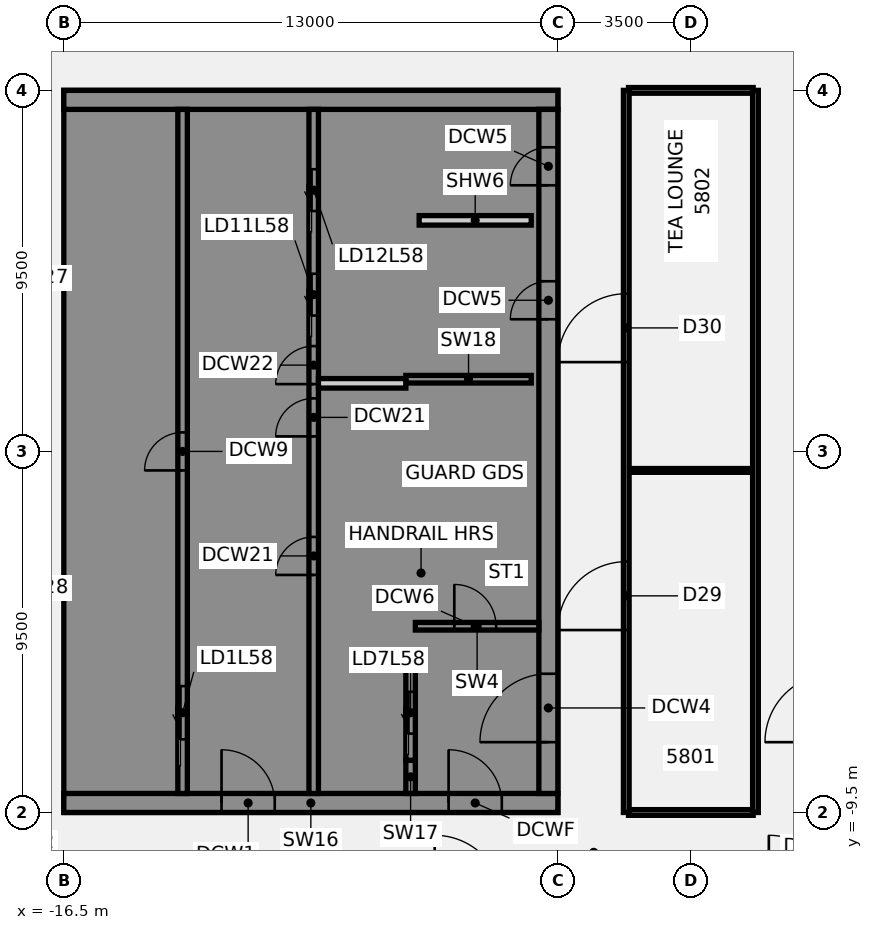
"""IFC4 building model, lengths in metres.
Left out: names, types, materials, properties, quantities, classifications, styles, units other than length and angle.
Written with IfcOpenShell. Run it as: python <this file> out.ifc"""

import sys

from ifc_helpers import new_model, si_unit, direction, frame, frame_2d, origin, place, context, subcontext, project, spatial, polyline, rectangle, outline, extrude, element, fill, save


model = new_model("IFC4")
c1 = context("Model", 3, precision=1e-05, world=origin(), true_north=direction((0.0, 1.0)))
c2 = subcontext(c1, "Body", "Model", "MODEL_VIEW")
j1 = project(units=[si_unit("LENGTHUNIT", "METRE"), si_unit("PLANEANGLEUNIT", "RADIAN")], contexts=[c1])
p1 = place(None, origin())
s1 = spatial("IfcSite", under=j1, at=p1, CompositionType="ELEMENT")
p2 = place(p1, origin())
s2 = spatial("IfcBuilding", under=s1, at=p2, CompositionType="ELEMENT")
p3 = place(p2, frame((0.0, 0.0, 230.7)))
s3 = spatial("IfcBuildingStorey", under=s2, at=p3, CompositionType="ELEMENT", Elevation=230.7)
p4 = place(p3, frame((-1.64, -9.5, 0.0), z_axis=(0.0, 0.0, 1.0), x_axis=(1.0, 0.0, 0.0)))
e1 = element("IfcWall", 1, at=p4, inside=s3, PredefinedType="PARTITIONING", context=c2, shape_type="SweptSolid", body=[
    extrude(rectangle(XDim=3.28, YDim=0.15, at=frame_2d((1.64, 0.0))), origin(), (0.0, 0.0, 1.0), 2.864),
])
p5 = place(p3, frame((-1.64, -0.5, 0.0), z_axis=(0.0, 0.0, 1.0), x_axis=(1.0, 0.0, 0.0)))
e2 = element("IfcWall", 2, at=p5, inside=s3, PredefinedType="PARTITIONING", context=c2, shape_type="SweptSolid", body=[
    extrude(rectangle(XDim=3.28, YDim=0.1, at=frame_2d((1.64, 0.0))), origin(), (0.0, 0.0, 1.0), 2.864),
])
p6 = place(p3, frame((-1.64, 9.5, 0.0), z_axis=(0.0, 0.0, 1.0), x_axis=(1.0, 0.0, 0.0)))
e3 = element("IfcWall", 3, at=p6, inside=s3, PredefinedType="PARTITIONING", context=c2, shape_type="SweptSolid", body=[
    extrude(rectangle(XDim=3.28, YDim=0.15, at=frame_2d((1.64, 0.0))), origin(), (0.0, 0.0, 1.0), 2.864),
])
p7 = place(p3, frame((-1.7, -9.5, 0.0), z_axis=(0.0, 0.0, 1.0), x_axis=(0.0, 1.0, 0.0)))
e4 = element("IfcWall", 4, at=p7, inside=s3, PredefinedType="PARTITIONING", context=c2, shape_type="SweptSolid", body=[
    extrude(rectangle(XDim=19.0, YDim=0.15, at=frame_2d((9.5, 0.0))), origin(), (0.0, 0.0, 1.0), 2.864),
])
p8 = place(p7, frame((4.8, 0.0, 0.0)))
e5 = element("IfcOpeningElement", 5, at=p8, cuts=e4, PredefinedType="OPENING", context=c2, shape_type="SweptSolid", body=[
    extrude(rectangle(XDim=1.8, YDim=2.1, at=frame_2d((0.9, 1.05))), frame((0.0, 0.085, 0.0), z_axis=(0.0, -1.0, 0.0), x_axis=(1.0, 0.0, 0.0)), (0.0, 0.0, 1.0), 0.17),
])
p9 = place(p7, frame((11.85, 0.0, 0.0)))
e6 = element("IfcOpeningElement", 6, at=p9, cuts=e4, PredefinedType="OPENING", context=c2, shape_type="SweptSolid", body=[
    extrude(rectangle(XDim=1.8, YDim=2.1, at=frame_2d((0.9, 1.05))), frame((0.0, 0.085, 0.0), z_axis=(0.0, -1.0, 0.0), x_axis=(1.0, 0.0, 0.0)), (0.0, 0.0, 1.0), 0.17),
])
p10 = place(p3, frame((1.7, -9.5, 0.0), z_axis=(0.0, 0.0, 1.0), x_axis=(0.0, 1.0, 0.0)))
e7 = element("IfcWall", 7, at=p10, inside=s3, PredefinedType="PARTITIONING", context=c2, shape_type="SweptSolid", body=[
    extrude(rectangle(XDim=19.0, YDim=0.15, at=frame_2d((9.5, 0.0))), origin(), (0.0, 0.0, 1.0), 2.864),
])
p11 = place(p3, frame((-16.5, -9.25, 0.0), z_axis=(0.0, 0.0, 1.0), x_axis=(1.0, 0.0, 0.0)))
e8 = element("IfcWall", 8, at=p11, inside=s3, PredefinedType="SHEAR", context=c2, shape_type="SweptSolid", body=[
    extrude(rectangle(XDim=13.0, YDim=0.5, at=frame_2d((6.5, 0.0))), origin(), (0.0, 0.0, 1.0), 3.46),
])
p12 = place(p11, frame((4.15, 0.0, 0.0)))
e9 = element("IfcOpeningElement", 9, at=p12, cuts=e8, PredefinedType="OPENING", context=c2, shape_type="SweptSolid", body=[
    extrude(rectangle(XDim=1.4, YDim=2.1, at=frame_2d((0.7, 1.05))), frame((0.0, 0.26, 0.0), z_axis=(0.0, -1.0, 0.0), x_axis=(1.0, 0.0, 0.0)), (0.0, 0.0, 1.0), 0.52),
])
p13 = place(p11, frame((10.125, 0.0, 0.0)))
e10 = element("IfcOpeningElement", 10, at=p13, cuts=e8, PredefinedType="OPENING", context=c2, shape_type="SweptSolid", body=[
    extrude(rectangle(XDim=1.4, YDim=2.1, at=frame_2d((0.7, 1.05))), frame((0.0, 0.26, 0.0), z_axis=(0.0, -1.0, 0.0), x_axis=(1.0, 0.0, 0.0)), (0.0, 0.0, 1.0), 0.52),
])
p14 = place(p3, origin())
e11 = element("IfcWall", 11, at=p14, inside=s3, PredefinedType="SHEAR", context=c2, shape_type="SweptSolid", body=[
    extrude(outline(polyline([(-13.5, -8.125), (-16.0, -8.125), (-16.0, -5.625), (-13.5, -5.625), (-13.5, -5.375), (-16.0, -5.375), (-16.0, 5.375), (-13.5, 5.375), (-13.5, 5.625), (-16.0, 5.625), (-16.0, 8.125), (-13.5, 8.125), (-13.5, 9.0), (-16.0, 9.0), (-16.5, 9.0), (-16.5, -9.0), (-16.0, -9.0), (-13.5, -9.0), (-13.5, -8.125)])), origin(), (0.0, 0.0, 1.0), 3.46),
])
p15 = place(p3, frame((-16.5, 9.25, 0.0), z_axis=(0.0, 0.0, 1.0), x_axis=(1.0, 0.0, 0.0)))
e12 = element("IfcWall", 12, at=p15, inside=s3, PredefinedType="SHEAR", context=c2, shape_type="SweptSolid", body=[
    extrude(rectangle(XDim=13.0, YDim=0.5, at=frame_2d((6.5, 0.0))), origin(), (0.0, 0.0, 1.0), 3.46),
])
p16 = place(p3, origin())
e13 = element("IfcWall", 13, at=p16, inside=s3, PredefinedType="SHEAR", context=c2, shape_type="SweptSolid", body=[
    extrude(outline(polyline([(-9.8, -5.375), (-9.8, -5.625), (-7.5, -5.625), (-7.25, -5.625), (-7.25, 9.0), (-7.5, 9.0), (-9.8, 9.0), (-9.8, 8.125), (-7.5, 8.125), (-7.5, 5.625), (-9.8, 5.625), (-9.8, 5.375), (-7.5, 5.375), (-7.5, 2.875), (-9.8, 2.875), (-9.8, 2.625), (-7.5, 2.625), (-7.5, -5.375), (-9.8, -5.375)])), origin(), (0.0, 0.0, 1.0), 3.46),
])
p17 = place(p3, origin())
e14 = element("IfcWall", 14, at=p17, inside=s3, PredefinedType="SHEAR", context=c2, shape_type="SweptSolid", body=[
    extrude(outline(polyline([(-7.5, -8.125), (-9.55, -8.125), (-9.55, -5.625), (-9.8, -5.625), (-9.8, -8.125), (-9.8, -9.0), (-7.5, -9.0), (-7.5, -8.125)])), origin(), (0.0, 0.0, 1.0), 3.46),
])
p18 = place(p3, frame((-7.375, -9.0, 0.0), z_axis=(0.0, 0.0, 1.0), x_axis=(0.0, 1.0, 0.0)))
e15 = element("IfcWall", 15, at=p18, inside=s3, PredefinedType="SHEAR", context=c2, shape_type="SweptSolid", body=[
    extrude(rectangle(XDim=0.875, YDim=0.25, at=frame_2d((0.438, 0.0))), origin(), (0.0, 0.0, 1.0), 3.46),
])
p19 = place(p3, frame((-7.5, 1.9, 0.0), z_axis=(0.0, 0.0, 1.0), x_axis=(1.0, 0.0, 0.0)))
e16 = element("IfcWall", 16, at=p19, inside=s3, PredefinedType="SHEAR", context=c2, shape_type="SweptSolid", body=[
    extrude(rectangle(XDim=3.3, YDim=0.2, at=frame_2d((1.65, 0.0))), origin(), (0.0, 0.0, 1.0), 3.46),
])
p20 = place(p3, frame((-13.375, -9.0, 0.0), z_axis=(0.0, 0.0, 1.0), x_axis=(0.0, 1.0, 0.0)))
e17 = element("IfcWall", 17, at=p20, inside=s3, PredefinedType="SHEAR", context=c2, shape_type="SweptSolid", body=[
    extrude(rectangle(XDim=18.0, YDim=0.25, at=frame_2d((9.0, 0.0))), origin(), (0.0, 0.0, 1.0), 3.46),
])
p21 = place(p20, frame((1.425, 0.0, 0.0)))
e18 = element("IfcOpeningElement", 18, at=p21, cuts=e17, PredefinedType="OPENING", context=c2, shape_type="SweptSolid", body=[
    extrude(rectangle(XDim=1.4, YDim=2.1, at=frame_2d((0.7, 1.05))), frame((0.0, 0.135, 0.0), z_axis=(0.0, -1.0, 0.0), x_axis=(1.0, 0.0, 0.0)), (0.0, 0.0, 1.0), 0.27),
])
p22 = place(p20, frame((8.5, 0.0, 0.0)))
e19 = element("IfcOpeningElement", 19, at=p22, cuts=e17, PredefinedType="OPENING", context=c2, shape_type="SweptSolid", body=[
    extrude(rectangle(XDim=1.0, YDim=2.1, at=frame_2d((0.5, 1.05))), frame((0.0, 0.135, 0.0), z_axis=(0.0, -1.0, 0.0), x_axis=(1.0, 0.0, 0.0)), (0.0, 0.0, 1.0), 0.27),
])
p23 = place(p3, frame((-9.925, -9.0, 0.0), z_axis=(0.0, 0.0, 1.0), x_axis=(0.0, 1.0, 0.0)))
e20 = element("IfcWall", 20, at=p23, inside=s3, PredefinedType="SHEAR", context=c2, shape_type="SweptSolid", body=[
    extrude(rectangle(XDim=18.0, YDim=0.25, at=frame_2d((9.0, 0.0))), origin(), (0.0, 0.0, 1.0), 3.46),
])
p24 = place(p23, frame((12.575, 0.0, 0.0)))
e21 = element("IfcOpeningElement", 21, at=p24, cuts=e20, PredefinedType="OPENING", context=c2, shape_type="SweptSolid", body=[
    extrude(rectangle(XDim=1.1, YDim=2.1, at=frame_2d((0.55, 1.05))), frame((0.0, 0.135, 0.0), z_axis=(0.0, -1.0, 0.0), x_axis=(1.0, 0.0, 0.0)), (0.0, 0.0, 1.0), 0.27),
])
p25 = place(p23, frame((15.325, 0.0, 0.0)))
e22 = element("IfcOpeningElement", 22, at=p25, cuts=e20, PredefinedType="OPENING", context=c2, shape_type="SweptSolid", body=[
    extrude(rectangle(XDim=1.1, YDim=2.1, at=frame_2d((0.55, 1.05))), frame((0.0, 0.135, 0.0), z_axis=(0.0, -1.0, 0.0), x_axis=(1.0, 0.0, 0.0)), (0.0, 0.0, 1.0), 0.27),
])
p26 = place(p23, frame((5.75, 0.0, 0.0)))
e23 = element("IfcOpeningElement", 23, at=p26, cuts=e20, PredefinedType="OPENING", context=c2, shape_type="SweptSolid", body=[
    extrude(rectangle(XDim=1.0, YDim=2.1, at=frame_2d((0.5, 1.05))), frame((0.0, 0.135, 0.0), z_axis=(0.0, -1.0, 0.0), x_axis=(1.0, 0.0, 0.0)), (0.0, 0.0, 1.0), 0.27),
])
p27 = place(p23, frame((9.396, 0.0, 0.0)))
e24 = element("IfcOpeningElement", 24, at=p27, cuts=e20, PredefinedType="OPENING", context=c2, shape_type="SweptSolid", body=[
    extrude(rectangle(XDim=1.0, YDim=2.1, at=frame_2d((0.5, 1.05))), frame((0.0, 0.135, 0.0), z_axis=(0.0, -1.0, 0.0), x_axis=(1.0, 0.0, 0.0)), (0.0, 0.0, 1.0), 0.27),
])
p28 = place(p23, frame((10.771, 0.0, 0.0)))
e25 = element("IfcOpeningElement", 25, at=p28, cuts=e20, PredefinedType="OPENING", context=c2, shape_type="SweptSolid", body=[
    extrude(rectangle(XDim=1.0, YDim=2.1, at=frame_2d((0.5, 1.05))), frame((0.0, 0.135, 0.0), z_axis=(0.0, -1.0, 0.0), x_axis=(1.0, 0.0, 0.0)), (0.0, 0.0, 1.0), 0.27),
])
p29 = place(p3, frame((-7.375, -8.125, 0.0), z_axis=(0.0, 0.0, 1.0), x_axis=(0.0, 1.0, 0.0)))
e26 = element("IfcWall", 26, at=p29, inside=s3, PredefinedType="SHEAR", context=c2, shape_type="SweptSolid", body=[
    extrude(rectangle(XDim=2.5, YDim=0.25, at=frame_2d((1.25, 0.0))), origin(), (0.0, 0.0, 1.0), 3.46),
])
p30 = place(p29, frame((0.7, 0.0, 0.0)))
e27 = element("IfcOpeningElement", 27, at=p30, cuts=e26, PredefinedType="OPENING", context=c2, shape_type="SweptSolid", body=[
    extrude(rectangle(XDim=1.1, YDim=2.1, at=frame_2d((0.55, 1.05))), frame((0.0, 0.135, 0.0), z_axis=(0.0, -1.0, 0.0), x_axis=(1.0, 0.0, 0.0)), (0.0, 0.0, 1.0), 0.27),
])
p31 = place(p3, frame((-3.75, -9.0, 0.0), z_axis=(0.0, 0.0, 1.0), x_axis=(0.0, 1.0, 0.0)))
e28 = element("IfcWall", 28, at=p31, inside=s3, PredefinedType="SHEAR", context=c2, shape_type="SweptSolid", body=[
    extrude(rectangle(XDim=18.0, YDim=0.5, at=frame_2d((9.0, 0.0))), origin(), (0.0, 0.0, 1.0), 3.46),
])
p32 = place(p31, frame((1.35, 0.0, 0.0)))
e29 = element("IfcOpeningElement", 29, at=p32, cuts=e28, PredefinedType="OPENING", context=c2, shape_type="SweptSolid", body=[
    extrude(rectangle(XDim=1.8, YDim=2.1, at=frame_2d((0.9, 1.05))), frame((0.0, 0.26, 0.0), z_axis=(0.0, -1.0, 0.0), x_axis=(1.0, 0.0, 0.0)), (0.0, 0.0, 1.0), 0.52),
])
p33 = place(p31, frame((12.478, 0.0, 0.0)))
e30 = element("IfcOpeningElement", 30, at=p33, cuts=e28, PredefinedType="OPENING", context=c2, shape_type="SweptSolid", body=[
    extrude(rectangle(XDim=1.0, YDim=2.1, at=frame_2d((0.5, 1.05))), frame((0.0, 0.26, 0.0), z_axis=(0.0, -1.0, 0.0), x_axis=(1.0, 0.0, 0.0)), (0.0, 0.0, 1.0), 0.52),
])
p34 = place(p31, frame((16.002, 0.0, 0.0)))
e31 = element("IfcOpeningElement", 31, at=p34, cuts=e28, PredefinedType="OPENING", context=c2, shape_type="SweptSolid", body=[
    extrude(rectangle(XDim=1.0, YDim=2.1, at=frame_2d((0.5, 1.05))), frame((0.0, 0.26, 0.0), z_axis=(0.0, -1.0, 0.0), x_axis=(1.0, 0.0, 0.0)), (0.0, 0.0, 1.0), 0.52),
])
p35 = place(p3, frame((-7.15, 6.08, 0.0), z_axis=(0.0, 0.0, 1.0), x_axis=(1.0, 0.0, 0.0)))
e32 = element("IfcWall", 32, at=p35, inside=s3, PredefinedType="PARTITIONING", context=c2, shape_type="SweptSolid", body=[
    extrude(rectangle(XDim=2.95, YDim=0.25, at=frame_2d((1.475, 0.0))), origin(), (0.0, 0.0, 1.0), 3.46),
])
p36 = place(p3, frame((-7.25, -4.6, 0.0), z_axis=(0.0, 0.0, 1.0), x_axis=(1.0, 0.0, 0.0)))
e33 = element("IfcWall", 33, at=p36, inside=s3, PredefinedType="SHEAR", context=c2, shape_type="SweptSolid", body=[
    extrude(rectangle(XDim=3.25, YDim=0.2, at=frame_2d((1.625, 0.0))), origin(), (0.0, 0.0, 1.0), 3.46),
])
p37 = place(p36, frame((1.025, 0.0, 0.0)))
e34 = element("IfcOpeningElement", 34, at=p37, cuts=e33, PredefinedType="OPENING", context=c2, shape_type="SweptSolid", body=[
    extrude(rectangle(XDim=1.1, YDim=2.1, at=frame_2d((0.55, 1.05))), frame((0.0, 0.11, 0.0), z_axis=(0.0, -1.0, 0.0), x_axis=(1.0, 0.0, 0.0)), (0.0, 0.0, 1.0), 0.22),
])
p38 = place(p3, frame((-9.8, 1.792, 0.0), z_axis=(0.0, 0.0, 1.0), x_axis=(1.0, 0.0, 0.0)))
e35 = element("IfcWall", 35, at=p38, inside=s3, PredefinedType="PARTITIONING", context=c2, shape_type="SweptSolid", body=[
    extrude(rectangle(XDim=2.3, YDim=0.25, at=frame_2d((1.15, 0.0))), origin(), (0.0, 0.0, 1.0), 3.46),
])
p39 = place(p8, frame((1.8, 0.0, 0.0), z_axis=(0.0, 0.0, 1.0), x_axis=(-1.0, 0.0, 0.0)))
e36 = element("IfcDoor", 36, at=p39, inside=s3, OperationType="DOUBLE_DOOR_SINGLE_SWING", PredefinedType="DOOR", context=c2, shape_type="SweptSolid", body=[
    extrude(rectangle(XDim=1.8, YDim=2.1, at=frame_2d((0.9, 1.05))), frame((0.0, 0.025, 0.0), z_axis=(0.0, -1.0, 0.0), x_axis=(1.0, 0.0, 0.0)), (0.0, 0.0, 1.0), 0.05),
])
fill(e5, e36)
p40 = place(p9, frame((1.8, 0.0, 0.0), z_axis=(0.0, 0.0, 1.0), x_axis=(-1.0, 0.0, 0.0)))
e37 = element("IfcDoor", 37, at=p40, inside=s3, OperationType="DOUBLE_DOOR_SINGLE_SWING", PredefinedType="DOOR", context=c2, shape_type="SweptSolid", body=[
    extrude(rectangle(XDim=1.8, YDim=2.1, at=frame_2d((0.9, 1.05))), frame((0.0, 0.025, 0.0), z_axis=(0.0, -1.0, 0.0), x_axis=(1.0, 0.0, 0.0)), (0.0, 0.0, 1.0), 0.05),
])
fill(e6, e37)
p41 = place(p12, origin())
e38 = element("IfcDoor", 38, at=p41, inside=s3, OperationType="SINGLE_SWING_LEFT", PredefinedType="DOOR", context=c2, shape_type="SweptSolid", body=[
    extrude(rectangle(XDim=1.4, YDim=2.1, at=frame_2d((0.7, 1.05))), frame((0.0, 0.025, 0.0), z_axis=(0.0, -1.0, 0.0), x_axis=(1.0, 0.0, 0.0)), (0.0, 0.0, 1.0), 0.05),
])
fill(e9, e38)
p42 = place(p13, origin())
e39 = element("IfcDoor", 39, at=p42, inside=s3, OperationType="SINGLE_SWING_LEFT", PredefinedType="DOOR", context=c2, shape_type="SweptSolid", body=[
    extrude(rectangle(XDim=1.4, YDim=2.1, at=frame_2d((0.7, 1.05))), frame((0.0, 0.025, 0.0), z_axis=(0.0, -1.0, 0.0), x_axis=(1.0, 0.0, 0.0)), (0.0, 0.0, 1.0), 0.05),
])
fill(e10, e39)
p43 = place(p32, origin())
e40 = element("IfcDoor", 40, at=p43, inside=s3, OperationType="SINGLE_SWING_LEFT", PredefinedType="DOOR", context=c2, shape_type="SweptSolid", body=[
    extrude(rectangle(XDim=1.8, YDim=2.1, at=frame_2d((0.9, 1.05))), frame((0.0, 0.025, 0.0), z_axis=(0.0, -1.0, 0.0), x_axis=(1.0, 0.0, 0.0)), (0.0, 0.0, 1.0), 0.05),
])
fill(e29, e40)
p44 = place(p33, origin())
e41 = element("IfcDoor", 41, at=p44, inside=s3, OperationType="SINGLE_SWING_LEFT", PredefinedType="DOOR", context=c2, shape_type="SweptSolid", body=[
    extrude(rectangle(XDim=1.0, YDim=2.1, at=frame_2d((0.5, 1.05))), frame((0.0, 0.225, 0.0), z_axis=(0.0, -1.0, 0.0), x_axis=(1.0, 0.0, 0.0)), (0.0, 0.0, 1.0), 0.05),
])
fill(e30, e41)
p45 = place(p34, origin())
e42 = element("IfcDoor", 42, at=p45, inside=s3, OperationType="SINGLE_SWING_LEFT", PredefinedType="DOOR", context=c2, shape_type="SweptSolid", body=[
    extrude(rectangle(XDim=1.0, YDim=2.1, at=frame_2d((0.5, 1.05))), frame((0.0, 0.225, 0.0), z_axis=(0.0, -1.0, 0.0), x_axis=(1.0, 0.0, 0.0)), (0.0, 0.0, 1.0), 0.05),
])
fill(e31, e42)
p46 = place(p37, origin())
e43 = element("IfcDoor", 43, at=p46, inside=s3, OperationType="SINGLE_SWING_LEFT", PredefinedType="DOOR", context=c2, shape_type="SweptSolid", body=[
    extrude(rectangle(XDim=1.1, YDim=2.1, at=frame_2d((0.55, 1.05))), frame((0.0, 0.025, 0.0), z_axis=(0.0, -1.0, 0.0), x_axis=(1.0, 0.0, 0.0)), (0.0, 0.0, 1.0), 0.05),
])
fill(e34, e43)
p47 = place(p21, origin())
e44 = element("IfcDoor", 44, at=p47, inside=s3, OperationType="SLIDING_TO_LEFT", PredefinedType="DOOR", context=c2, shape_type="SweptSolid", body=[
    extrude(rectangle(XDim=1.4, YDim=2.1, at=frame_2d((0.7, 1.05))), frame((0.0, 0.025, 0.0), z_axis=(0.0, -1.0, 0.0), x_axis=(1.0, 0.0, 0.0)), (0.0, 0.0, 1.0), 0.05),
])
fill(e18, e44)
p48 = place(p30, origin())
e45 = element("IfcDoor", 45, at=p48, inside=s3, OperationType="SLIDING_TO_LEFT", PredefinedType="DOOR", context=c2, shape_type="SweptSolid", body=[
    extrude(rectangle(XDim=1.1, YDim=2.1, at=frame_2d((0.55, 1.05))), frame((0.0, 0.025, 0.0), z_axis=(0.0, -1.0, 0.0), x_axis=(1.0, 0.0, 0.0)), (0.0, 0.0, 1.0), 0.05),
])
fill(e27, e45)
p49 = place(p24, origin())
e46 = element("IfcDoor", 46, at=p49, inside=s3, OperationType="SLIDING_TO_LEFT", PredefinedType="DOOR", context=c2, shape_type="SweptSolid", body=[
    extrude(rectangle(XDim=1.1, YDim=2.1, at=frame_2d((0.55, 1.05))), frame((0.0, 0.025, 0.0), z_axis=(0.0, -1.0, 0.0), x_axis=(1.0, 0.0, 0.0)), (0.0, 0.0, 1.0), 0.05),
])
fill(e21, e46)
p50 = place(p25, origin())
e47 = element("IfcDoor", 47, at=p50, inside=s3, OperationType="SLIDING_TO_LEFT", PredefinedType="DOOR", context=c2, shape_type="SweptSolid", body=[
    extrude(rectangle(XDim=1.1, YDim=2.1, at=frame_2d((0.55, 1.05))), frame((0.0, 0.025, 0.0), z_axis=(0.0, -1.0, 0.0), x_axis=(1.0, 0.0, 0.0)), (0.0, 0.0, 1.0), 0.05),
])
fill(e22, e47)
p51 = place(p22, origin())
e48 = element("IfcDoor", 48, at=p51, inside=s3, OperationType="SINGLE_SWING_LEFT", PredefinedType="DOOR", context=c2, shape_type="SweptSolid", body=[
    extrude(rectangle(XDim=1.0, YDim=2.1, at=frame_2d((0.5, 1.05))), frame((0.0, 0.025, 0.0), z_axis=(0.0, -1.0, 0.0), x_axis=(1.0, 0.0, 0.0)), (0.0, 0.0, 1.0), 0.05),
])
fill(e19, e48)
p52 = place(p26, origin())
e49 = element("IfcDoor", 49, at=p52, inside=s3, OperationType="SINGLE_SWING_LEFT", PredefinedType="DOOR", context=c2, shape_type="SweptSolid", body=[
    extrude(rectangle(XDim=1.0, YDim=2.1, at=frame_2d((0.5, 1.05))), frame((0.0, 0.025, 0.0), z_axis=(0.0, -1.0, 0.0), x_axis=(1.0, 0.0, 0.0)), (0.0, 0.0, 1.0), 0.05),
])
fill(e23, e49)
p53 = place(p27, origin())
e50 = element("IfcDoor", 50, at=p53, inside=s3, OperationType="SINGLE_SWING_LEFT", PredefinedType="DOOR", context=c2, shape_type="SweptSolid", body=[
    extrude(rectangle(XDim=1.0, YDim=2.1, at=frame_2d((0.5, 1.05))), frame((0.0, 0.025, 0.0), z_axis=(0.0, -1.0, 0.0), x_axis=(1.0, 0.0, 0.0)), (0.0, 0.0, 1.0), 0.05),
])
fill(e24, e50)
p54 = place(p28, origin())
e51 = element("IfcDoor", 51, at=p54, inside=s3, OperationType="SINGLE_SWING_LEFT", PredefinedType="DOOR", context=c2, shape_type="SweptSolid", body=[
    extrude(rectangle(XDim=1.0, YDim=2.1, at=frame_2d((0.5, 1.05))), frame((0.0, 0.025, 0.0), z_axis=(0.0, -1.0, 0.0), x_axis=(1.0, 0.0, 0.0)), (0.0, 0.0, 1.0), 0.05),
])
fill(e25, e51)
save(model, sys.argv[1])
